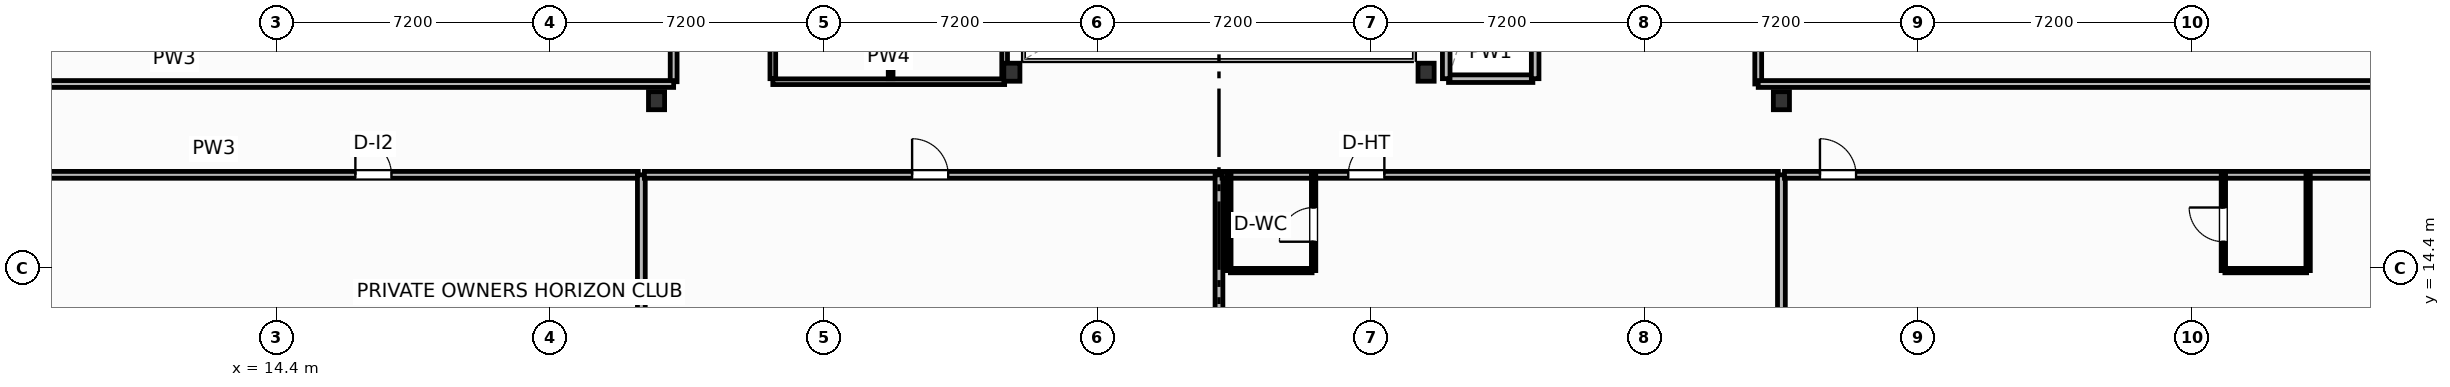
"""IFC4 building model, lengths in metres.
Left out: names, types, materials, properties, quantities, classifications, styles, units other than length and angle.
Written with IfcOpenShell. Run it as: python <this file> out.ifc"""

import sys

from ifc_helpers import new_model, si_unit, direction, frame, frame_2d, origin, origin_2d, place, context, subcontext, project, spatial, rectangle, i_section, extrude, element, fill, save


model = new_model("IFC4")
c1 = context("Model", 3, precision=1e-05, world=origin(), true_north=direction((0.0, 1.0)))
c2 = subcontext(c1, "Body", "Model", "MODEL_VIEW")
j1 = project(units=[si_unit("LENGTHUNIT", "METRE"), si_unit("PLANEANGLEUNIT", "RADIAN")], contexts=[c1])
p1 = place(None, origin())
s1 = spatial("IfcSite", under=j1, at=p1, CompositionType="ELEMENT")
p2 = place(p1, origin())
s2 = spatial("IfcBuilding", under=s1, at=p2, CompositionType="ELEMENT")
p3 = place(p2, frame((0.0, 0.0, 105.8)))
s3 = spatial("IfcBuildingStorey", under=s2, at=p3, CompositionType="ELEMENT", Elevation=105.8)
for number, where, z_axis, x_axis in (
    (1, (33.75, 19.55, 0.0), (0.0, 0.0, 1.0), (1.0, 0.0, 0.0)),
    (2, (44.65, 19.55, 0.0), (0.0, 0.0, 1.0), (1.0, 0.0, 0.0)),
    (3, (24.4, 18.8, 0.0), (0.0, 0.0, 1.0), (1.0, 0.0, 0.0)),
    (4, (54.0, 18.8, 0.0), (0.0, 0.0, 1.0), (1.0, 0.0, 0.0)),
):
    element("IfcColumn", number, at=place(p3, frame(where, z_axis=z_axis, x_axis=x_axis)), inside=s3, PredefinedType="COLUMN", context=c2, shape_type="SweptSolid", body=[
        extrude(i_section(OverallWidth=0.424, OverallDepth=0.474, WebThickness=0.048, FlangeThickness=0.077, FilletRadius=0.025, at=origin_2d()), origin(), (0.0, 0.0, 1.0), 3.7),
    ])
p4 = place(p3, frame((1.026, 14.753, 0.0), z_axis=(0.0, 0.0, 1.0), x_axis=(0.935222448475, -0.354060689526, 0.0)))
e5 = element("IfcWall", 5, at=p4, inside=s3, PredefinedType="SOLIDWALL", context=c2, shape_type="SweptSolid", body=[
    extrude(rectangle(XDim=14.447, YDim=0.22, at=frame_2d((7.224, 0.0))), origin(), (0.0, 0.0, 1.0), 2.73),
])
p5 = place(p4, frame((6.399, 0.0, 0.8)))
e6 = element("IfcOpeningElement", 6, at=p5, cuts=e5, PredefinedType="OPENING", context=c2, shape_type="SweptSolid", body=[
    extrude(rectangle(XDim=1.65, YDim=1.65, at=frame_2d((0.825, 0.825))), frame((0.0, 0.12, 0.0), z_axis=(0.0, -1.0, 0.0), x_axis=(1.0, 0.0, 0.0)), (0.0, 0.0, 1.0), 0.24),
])
p6 = place(p3, frame((1.58, 16.85, 0.0), z_axis=(0.0, 0.0, 1.0), x_axis=(1.0, 0.0, 0.0)))
e7 = element("IfcWall", 7, at=p6, inside=s3, PredefinedType="PARTITIONING", context=c2, shape_type="SweptSolid", body=[
    extrude(rectangle(XDim=22.34, YDim=0.18, at=frame_2d((11.17, 0.0))), origin(), (0.0, 0.0, 1.0), 3.45),
])
p7 = place(p6, frame((14.895, 0.0, 0.0)))
e8 = element("IfcOpeningElement", 8, at=p7, cuts=e7, PredefinedType="OPENING", context=c2, shape_type="SweptSolid", body=[
    extrude(rectangle(XDim=0.95, YDim=2.05, at=frame_2d((0.475, 1.025))), frame((0.0, 0.1, 0.0), z_axis=(0.0, -1.0, 0.0), x_axis=(1.0, 0.0, 0.0)), (0.0, 0.0, 1.0), 0.2),
])
p8 = place(p3, frame((24.0, 6.076, 0.0), z_axis=(0.0, 0.0, 1.0), x_axis=(0.0, 1.0, 0.0)))
e9 = element("IfcWall", 9, at=p8, inside=s3, PredefinedType="PARTITIONING", context=c2, shape_type="SweptSolid", body=[
    extrude(rectangle(XDim=10.774, YDim=0.205, at=frame_2d((5.387, 0.0))), origin(), (0.0, 0.0, 1.0), 2.58),
])
p9 = place(p3, frame((24.08, 16.85, 0.0), z_axis=(0.0, 0.0, 1.0), x_axis=(1.0, 0.0, 0.0)))
e10 = element("IfcWall", 10, at=p9, inside=s3, PredefinedType="PARTITIONING", context=c2, shape_type="SweptSolid", body=[
    extrude(rectangle(XDim=15.04, YDim=0.18, at=frame_2d((7.52, 0.0))), origin(), (0.0, 0.0, 1.0), 3.45),
])
p10 = place(p9, frame((7.045, 0.0, 0.0)))
e11 = element("IfcOpeningElement", 11, at=p10, cuts=e10, PredefinedType="OPENING", context=c2, shape_type="SweptSolid", body=[
    extrude(rectangle(XDim=0.95, YDim=2.05, at=frame_2d((0.475, 1.025))), frame((0.0, 0.1, 0.0), z_axis=(0.0, -1.0, 0.0), x_axis=(1.0, 0.0, 0.0)), (0.0, 0.0, 1.0), 0.2),
])
p11 = place(p3, frame((39.2, 0.322, 0.0), z_axis=(0.0, 0.0, 1.0), x_axis=(0.0, 1.0, 0.0)))
e12 = element("IfcWall", 12, at=p11, inside=s3, PredefinedType="PARTITIONING", context=c2, shape_type="SweptSolid", body=[
    extrude(rectangle(XDim=16.528, YDim=0.205, at=frame_2d((8.264, 0.0))), origin(), (0.0, 0.0, 1.0), 3.45),
])
p12 = place(p3, frame((39.28, 16.85, 0.0), z_axis=(0.0, 0.0, 1.0), x_axis=(1.0, 0.0, 0.0)))
e13 = element("IfcWall", 13, at=p12, inside=s3, PredefinedType="PARTITIONING", context=c2, shape_type="SweptSolid", body=[
    extrude(rectangle(XDim=14.64, YDim=0.18, at=frame_2d((7.32, 0.0))), origin(), (0.0, 0.0, 1.0), 3.45),
])
p13 = place(p12, frame((3.322, 0.0, 0.0)))
e14 = element("IfcOpeningElement", 14, at=p13, cuts=e13, PredefinedType="OPENING", context=c2, shape_type="SweptSolid", body=[
    extrude(rectangle(XDim=0.95, YDim=2.15, at=frame_2d((0.475, 1.075))), frame((0.0, 0.1, 0.0), z_axis=(0.0, -1.0, 0.0), x_axis=(1.0, 0.0, 0.0)), (0.0, 0.0, 1.0), 0.2),
])
p14 = place(p3, frame((39.5, 14.33, 0.0), z_axis=(0.0, 0.0, 1.0), x_axis=(1.0, 0.0, 0.0)))
e15 = element("IfcWall", 15, at=p14, inside=s3, PredefinedType="PARTITIONING", context=c2, shape_type="SweptSolid", body=[
    extrude(rectangle(XDim=2.15, YDim=0.115, at=frame_2d((1.075, 0.0))), origin(), (0.0, 0.0, 1.0), 3.45),
])
p15 = place(p3, frame((41.69, 14.33, 0.0), z_axis=(0.0, 0.0, 1.0), x_axis=(0.0, 1.0, 0.0)))
e16 = element("IfcWall", 16, at=p15, inside=s3, PredefinedType="PARTITIONING", context=c2, shape_type="SweptSolid", body=[
    extrude(rectangle(XDim=2.52, YDim=0.115, at=frame_2d((1.26, 0.0))), origin(), (0.0, 0.0, 1.0), 3.45),
])
p16 = place(p15, frame((0.76, 0.0, 0.0)))
e17 = element("IfcOpeningElement", 17, at=p16, cuts=e16, PredefinedType="OPENING", context=c2, shape_type="SweptSolid", body=[
    extrude(rectangle(XDim=0.9, YDim=2.05, at=frame_2d((0.45, 1.025))), frame((0.0, 0.067, 0.0), z_axis=(0.0, -1.0, 0.0), x_axis=(1.0, 0.0, 0.0)), (0.0, 0.0, 1.0), 0.135),
])
p17 = place(p3, frame((39.46, 14.33, 0.0), z_axis=(0.0, 0.0, 1.0), x_axis=(0.0, 1.0, 0.0)))
e18 = element("IfcWall", 18, at=p17, inside=s3, PredefinedType="PARTITIONING", context=c2, shape_type="SweptSolid", body=[
    extrude(rectangle(XDim=2.52, YDim=0.115, at=frame_2d((1.26, 0.0))), origin(), (0.0, 0.0, 1.0), 3.45),
])
p18 = place(p3, frame((54.0, -4.0, 0.0), z_axis=(0.0, 0.0, 1.0), x_axis=(0.0, 1.0, 0.0)))
e19 = element("IfcWall", 19, at=p18, inside=s3, PredefinedType="PARTITIONING", context=c2, shape_type="SweptSolid", body=[
    extrude(rectangle(XDim=20.85, YDim=0.205, at=frame_2d((10.425, 0.0))), origin(), (0.0, 0.0, 1.0), 3.45),
])
p19 = place(p3, frame((54.08, 16.85, 0.0), z_axis=(0.0, 0.0, 1.0), x_axis=(1.0, 0.0, 0.0)))
e20 = element("IfcWall", 20, at=p19, inside=s3, PredefinedType="PARTITIONING", context=c2, shape_type="SweptSolid", body=[
    extrude(rectangle(XDim=21.722, YDim=0.18, at=frame_2d((10.861, 0.0))), origin(), (0.0, 0.0, 1.0), 2.58),
])
p20 = place(p19, frame((0.934, 0.0, 0.0)))
e21 = element("IfcOpeningElement", 21, at=p20, cuts=e20, PredefinedType="OPENING", context=c2, shape_type="SweptSolid", body=[
    extrude(rectangle(XDim=0.95, YDim=2.15, at=frame_2d((0.475, 1.075))), frame((0.0, 0.1, 0.0), z_axis=(0.0, -1.0, 0.0), x_axis=(1.0, 0.0, 0.0)), (0.0, 0.0, 1.0), 0.2),
])
p21 = place(p3, frame((65.67, 14.33, 0.0), z_axis=(0.0, 0.0, 1.0), x_axis=(1.0, 0.0, 0.0)))
e22 = element("IfcWall", 22, at=p21, inside=s3, PredefinedType="PARTITIONING", context=c2, shape_type="SweptSolid", body=[
    extrude(rectangle(XDim=2.15, YDim=0.115, at=frame_2d((1.075, 0.0))), origin(), (0.0, 0.0, 1.0), 2.58),
])
p22 = place(p3, frame((65.63, 14.33, 0.0), z_axis=(0.0, 0.0, 1.0), x_axis=(0.0, 1.0, 0.0)))
e23 = element("IfcWall", 23, at=p22, inside=s3, PredefinedType="PARTITIONING", context=c2, shape_type="SweptSolid", body=[
    extrude(rectangle(XDim=2.52, YDim=0.115, at=frame_2d((1.26, 0.0))), origin(), (0.0, 0.0, 1.0), 3.45),
])
p23 = place(p22, frame((0.76, 0.0, 0.0)))
e24 = element("IfcOpeningElement", 24, at=p23, cuts=e23, PredefinedType="OPENING", context=c2, shape_type="SweptSolid", body=[
    extrude(rectangle(XDim=0.9, YDim=2.05, at=frame_2d((0.45, 1.025))), frame((0.0, 0.067, 0.0), z_axis=(0.0, -1.0, 0.0), x_axis=(1.0, 0.0, 0.0)), (0.0, 0.0, 1.0), 0.135),
])
p24 = place(p3, frame((67.86, 14.33, 0.0), z_axis=(0.0, 0.0, 1.0), x_axis=(0.0, 1.0, 0.0)))
e25 = element("IfcWall", 25, at=p24, inside=s3, PredefinedType="PARTITIONING", context=c2, shape_type="SweptSolid", body=[
    extrude(rectangle(XDim=2.52, YDim=0.115, at=frame_2d((1.26, 0.0))), origin(), (0.0, 0.0, 1.0), 3.45),
])
p25 = place(p3, frame((24.85, 19.3, 0.0), z_axis=(0.0, 0.0, 1.0), x_axis=(0.0, 1.0, 0.0)))
e26 = element("IfcWall", 26, at=p25, inside=s3, PredefinedType="PARTITIONING", context=c2, shape_type="SweptSolid", body=[
    extrude(rectangle(XDim=3.57, YDim=0.18, at=frame_2d((1.785, 0.0))), origin(), (0.0, 0.0, 1.0), 3.45),
])
p26 = place(p25, frame((1.5, 0.0, 0.0)))
e27 = element("IfcOpeningElement", 27, at=p26, cuts=e26, PredefinedType="OPENING", context=c2, shape_type="SweptSolid", body=[
    extrude(rectangle(XDim=0.92, YDim=2.05, at=frame_2d((0.46, 1.025))), frame((0.0, 0.1, 0.0), z_axis=(0.0, -1.0, 0.0), x_axis=(1.0, 0.0, 0.0)), (0.0, 0.0, 1.0), 0.2),
])
p27 = place(p3, frame((-1.432, 19.24, 0.0), z_axis=(0.0, 0.0, 1.0), x_axis=(1.0, 0.0, 0.0)))
e28 = element("IfcWall", 28, at=p27, inside=s3, PredefinedType="PARTITIONING", context=c2, shape_type="SweptSolid", body=[
    extrude(rectangle(XDim=26.282, YDim=0.18, at=frame_2d((13.141, 0.0))), origin(), (0.0, 0.0, 1.0), 3.45),
])
p28 = place(p3, frame((53.39, 19.24, 0.0), z_axis=(0.0, 0.0, 1.0), x_axis=(0.0, 1.0, 0.0)))
e29 = element("IfcWall", 29, at=p28, inside=s3, PredefinedType="PARTITIONING", context=c2, shape_type="SweptSolid", body=[
    extrude(rectangle(XDim=7.52, YDim=0.18, at=frame_2d((3.76, 0.0))), origin(), (0.0, 0.0, 1.0), 3.45),
])
p29 = place(p28, frame((2.1, 0.0, 0.0)))
e30 = element("IfcOpeningElement", 30, at=p29, cuts=e29, PredefinedType="OPENING", context=c2, shape_type="SweptSolid", body=[
    extrude(rectangle(XDim=0.92, YDim=2.05, at=frame_2d((0.46, 1.025))), frame((0.0, 0.1, 0.0), z_axis=(0.0, -1.0, 0.0), x_axis=(1.0, 0.0, 0.0)), (0.0, 0.0, 1.0), 0.2),
])
p30 = place(p3, frame((53.39, 19.24, 0.0), z_axis=(0.0, 0.0, 1.0), x_axis=(1.0, 0.0, 0.0)))
e31 = element("IfcWall", 31, at=p30, inside=s3, PredefinedType="PARTITIONING", context=c2, shape_type="SweptSolid", body=[
    extrude(rectangle(XDim=23.317, YDim=0.18, at=frame_2d((11.658, 0.0))), origin(), (0.0, 0.0, 1.0), 3.45),
])
p31 = place(p3, frame((27.46, 19.3, 0.0), z_axis=(0.0, 0.0, 1.0), x_axis=(1.0, 0.0, 0.0)))
e32 = element("IfcWall", 32, at=p31, inside=s3, PredefinedType="PARTITIONING", context=c2, shape_type="SweptSolid", body=[
    extrude(rectangle(XDim=6.1, YDim=0.15, at=frame_2d((3.05, 0.0))), origin(), (0.0, 0.0, 1.0), 2.662),
])
p32 = place(p3, frame((30.56, 19.38, 0.0), z_axis=(0.0, 0.0, 1.0), x_axis=(0.0, 1.0, 0.0)))
e33 = element("IfcWall", 33, at=p32, inside=s3, PredefinedType="PARTITIONING", context=c2, shape_type="SweptSolid", body=[
    extrude(rectangle(XDim=7.16, YDim=0.125, at=frame_2d((3.58, 0.0))), origin(), (0.0, 0.0, 1.0), 3.45),
])
p33 = place(p32, frame((1.4, 0.0, 0.0)))
e34 = element("IfcOpeningElement", 34, at=p33, cuts=e33, PredefinedType="OPENING", context=c2, shape_type="SweptSolid", body=[
    extrude(rectangle(XDim=0.92, YDim=2.05, at=frame_2d((0.46, 1.025))), frame((0.0, 0.073, 0.0), z_axis=(0.0, -1.0, 0.0), x_axis=(1.0, 0.0, 0.0)), (0.0, 0.0, 1.0), 0.145),
])
p34 = place(p3, frame((27.46, 19.38, 0.0), z_axis=(0.0, 0.0, 1.0), x_axis=(0.0, 1.0, 0.0)))
e35 = element("IfcWall", 35, at=p34, inside=s3, PredefinedType="PARTITIONING", context=c2, shape_type="SweptSolid", body=[
    extrude(rectangle(XDim=7.16, YDim=0.15, at=frame_2d((3.58, 0.0))), origin(), (0.0, 0.0, 1.0), 3.45),
])
p35 = place(p3, frame((33.56, 19.38, 0.0), z_axis=(0.0, 0.0, 1.0), x_axis=(0.0, 1.0, 0.0)))
e36 = element("IfcWall", 36, at=p35, inside=s3, PredefinedType="PARTITIONING", context=c2, shape_type="SweptSolid", body=[
    extrude(rectangle(XDim=7.16, YDim=0.15, at=frame_2d((3.58, 0.0))), origin(), (0.0, 0.0, 1.0), 2.824),
])
p36 = place(p3, frame((45.24, 19.38, 0.0), z_axis=(0.0, 0.0, 1.0), x_axis=(1.0, 0.0, 0.0)))
e37 = element("IfcWall", 37, at=p36, inside=s3, PredefinedType="PARTITIONING", context=c2, shape_type="SweptSolid", body=[
    extrude(rectangle(XDim=2.22, YDim=0.2, at=frame_2d((1.11, 0.0))), origin(), (0.0, 0.0, 1.0), 2.662),
])
for number, where, z_axis, x_axis in (
    (38, (45.18, 19.38, 0.0), (0.0, 0.0, 1.0), (0.0, 1.0, 0.0)),
    (39, (47.52, 19.38, 0.0), (0.0, 0.0, 1.0), (0.0, 1.0, 0.0)),
):
    element("IfcWall", number, at=place(p3, frame(where, z_axis=z_axis, x_axis=x_axis)), inside=s3, PredefinedType="PARTITIONING", context=c2, shape_type="SweptSolid", body=[
        extrude(rectangle(XDim=6.9, YDim=0.2, at=frame_2d((3.45, 0.0))), origin(), (0.0, 0.0, 1.0), 3.45),
    ])
p37 = place(p7, origin())
e40 = element("IfcDoor", 40, at=p37, inside=s3, OperationType="SINGLE_SWING_LEFT", PredefinedType="DOOR", context=c2, shape_type="SweptSolid", body=[
    extrude(rectangle(XDim=0.95, YDim=2.05, at=frame_2d((0.475, 1.025))), frame((0.0, 0.025, 0.0), z_axis=(0.0, -1.0, 0.0), x_axis=(1.0, 0.0, 0.0)), (0.0, 0.0, 1.0), 0.05),
])
fill(e8, e40)
p38 = place(p10, origin())
e41 = element("IfcDoor", 41, at=p38, inside=s3, OperationType="SINGLE_SWING_LEFT", PredefinedType="DOOR", context=c2, shape_type="SweptSolid", body=[
    extrude(rectangle(XDim=0.95, YDim=2.05, at=frame_2d((0.475, 1.025))), frame((0.0, 0.025, 0.0), z_axis=(0.0, -1.0, 0.0), x_axis=(1.0, 0.0, 0.0)), (0.0, 0.0, 1.0), 0.05),
])
fill(e11, e41)
p39 = place(p13, origin())
e42 = element("IfcDoor", 42, at=p39, inside=s3, OperationType="SINGLE_SWING_RIGHT", PredefinedType="DOOR", context=c2, shape_type="SweptSolid", body=[
    extrude(rectangle(XDim=0.95, YDim=2.15, at=frame_2d((0.475, 1.075))), frame((0.0, 0.025, 0.0), z_axis=(0.0, -1.0, 0.0), x_axis=(1.0, 0.0, 0.0)), (0.0, 0.0, 1.0), 0.05),
])
fill(e14, e42)
p40 = place(p16, origin())
e43 = element("IfcDoor", 43, at=p40, inside=s3, OperationType="SINGLE_SWING_LEFT", PredefinedType="DOOR", context=c2, shape_type="SweptSolid", body=[
    extrude(rectangle(XDim=0.9, YDim=2.05, at=frame_2d((0.45, 1.025))), frame((0.0, 0.025, 0.0), z_axis=(0.0, -1.0, 0.0), x_axis=(1.0, 0.0, 0.0)), (0.0, 0.0, 1.0), 0.05),
])
fill(e17, e43)
p41 = place(p20, origin())
e44 = element("IfcDoor", 44, at=p41, inside=s3, OperationType="SINGLE_SWING_LEFT", PredefinedType="DOOR", context=c2, shape_type="SweptSolid", body=[
    extrude(rectangle(XDim=0.95, YDim=2.15, at=frame_2d((0.475, 1.075))), frame((0.0, 0.025, 0.0), z_axis=(0.0, -1.0, 0.0), x_axis=(1.0, 0.0, 0.0)), (0.0, 0.0, 1.0), 0.05),
])
fill(e21, e44)
p42 = place(p23, origin())
e45 = element("IfcDoor", 45, at=p42, inside=s3, OperationType="SINGLE_SWING_RIGHT", PredefinedType="DOOR", context=c2, shape_type="SweptSolid", body=[
    extrude(rectangle(XDim=0.9, YDim=2.05, at=frame_2d((0.45, 1.025))), frame((0.0, 0.025, 0.0), z_axis=(0.0, -1.0, 0.0), x_axis=(1.0, 0.0, 0.0)), (0.0, 0.0, 1.0), 0.05),
])
fill(e24, e45)
save(model, sys.argv[1])
